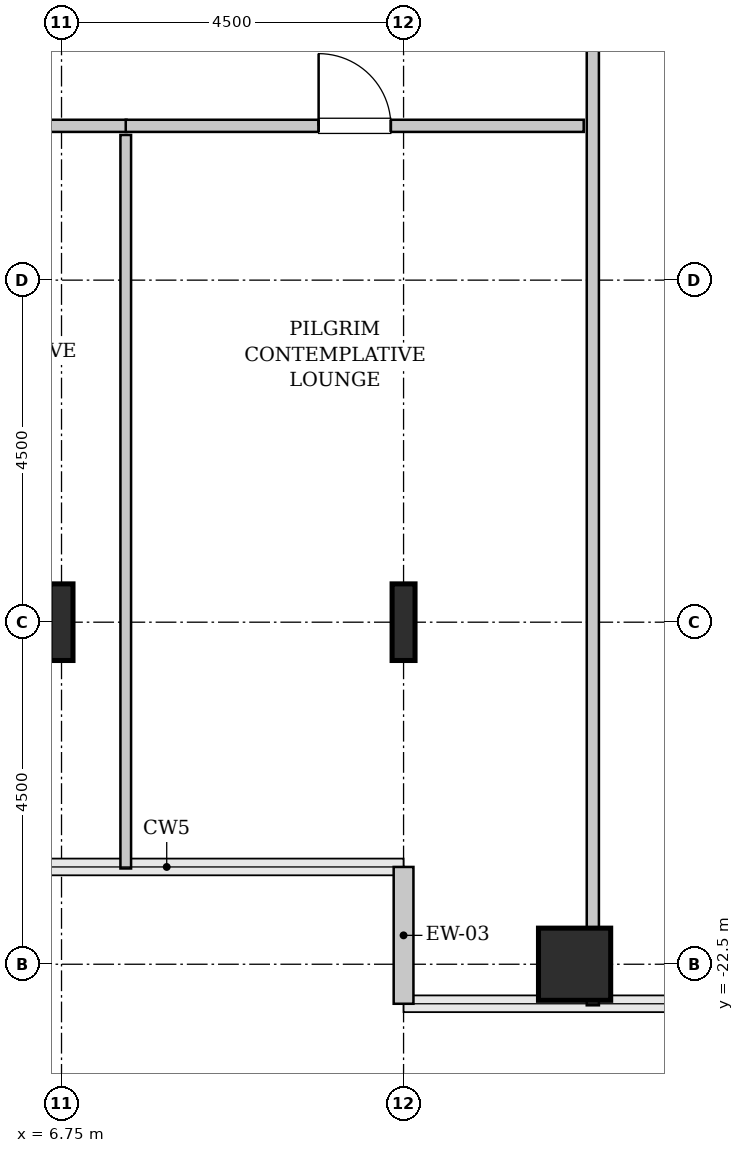
"""IFC4 building model, lengths in metres.
Left out: names, types, materials, properties, quantities, classifications, styles, units other than length and angle.
Written with IfcOpenShell. Run it as: python <this file> out.ifc"""

import sys

from ifc_helpers import new_model, si_unit, direction, frame, frame_2d, origin, origin_2d, place, context, subcontext, project, spatial, rectangle, hollow_rectangle, i_section, extrude, source, transform, mapped, element, fill, save


model = new_model("IFC4")
c1 = context("Model", 3, precision=1e-05, world=origin(), true_north=direction((0.0, 1.0)))
c2 = subcontext(c1, "Body", "Model", "MODEL_VIEW")
j1 = project(units=[si_unit("LENGTHUNIT", "METRE"), si_unit("PLANEANGLEUNIT", "RADIAN")], contexts=[c1])
p1 = place(None, origin())
s1 = spatial("IfcSite", under=j1, at=p1, CompositionType="ELEMENT")
p2 = place(p1, origin())
s2 = spatial("IfcBuilding", under=s1, at=p2, CompositionType="ELEMENT")
p3 = place(p2, frame((0.0, 0.0, 52.0)))
s3 = spatial("IfcBuildingStorey", under=s2, at=p3, CompositionType="ELEMENT", Elevation=52.0)
m1 = source(origin(), c2, "Body", "SweptSolid", [
    extrude(i_section(OverallWidth=0.302, OverallDepth=1.008, WebThickness=0.021, FlangeThickness=0.04, FilletRadius=0.03, at=origin_2d()), origin(), (0.0, 0.0, 1.0), 3.8),
])
for number, where, z_axis, x_axis in (
    (1, (6.75, -18.0, 0.0), (0.0, 0.0, 1.0), (1.0, 0.0, 0.0)),
    (2, (11.25, -18.0, 0.0), (0.0, 0.0, 1.0), (1.0, 0.0, 0.0)),
):
    element("IfcColumn", number, at=place(p3, frame(where, z_axis=z_axis, x_axis=x_axis)), inside=s3, PredefinedType="COLUMN", context=c2, shape_type="MappedRepresentation", body=[
        mapped(m1, transform((0.0, 0.0, 0.0), x_axis=(1.0, 0.0, 0.0), y_axis=(0.0, 1.0, 0.0), z_axis=(0.0, 0.0, 1.0), scale=1.0)),
    ])
m2 = source(origin(), c2, "Body", "SweptSolid", [
    extrude(hollow_rectangle(XDim=0.95, YDim=0.95, WallThickness=0.045, InnerFilletRadius=0.045, OuterFilletRadius=0.09, at=origin_2d()), origin(), (0.0, 0.0, 1.0), 3.8),
])
p4 = place(p3, frame((13.5, -22.5, 0.0), z_axis=(0.0, 0.0, 1.0), x_axis=(1.0, 0.0, 0.0)))
e3 = element("IfcColumn", 3, at=p4, inside=s3, PredefinedType="COLUMN", context=c2, shape_type="MappedRepresentation", body=[
    mapped(m2, transform((0.0, 0.0, 0.0), x_axis=(1.0, 0.0, 0.0), y_axis=(0.0, 1.0, 0.0), z_axis=(0.0, 0.0, 1.0), scale=1.0)),
])
m3 = source(origin(), c2, "Body", "SweptSolid", [
    extrude(rectangle(XDim=1.8, YDim=0.26, at=frame_2d((0.9, 0.0))), origin(), (0.0, 0.0, 1.0), 3.55),
])
p5 = place(p3, frame((11.25, -21.22, 0.0), z_axis=(0.0, 0.0, 1.0), x_axis=(0.0, -1.0, 0.0)))
e4 = element("IfcWall", 4, at=p5, inside=s3, PredefinedType="SOLIDWALL", context=c2, shape_type="MappedRepresentation", body=[
    mapped(m3, transform((0.0, 0.0, 0.0), x_axis=(1.0, 0.0, 0.0), y_axis=(0.0, 1.0, 0.0), z_axis=(0.0, 0.0, 1.0), scale=1.0)),
])
m4 = source(origin(), c2, "Body", "SweptSolid", [
    extrude(rectangle(XDim=15.845, YDim=0.16, at=frame_2d((7.922, 0.0))), origin(), (0.0, 0.0, 1.0), 3.535),
])
p6 = place(p3, frame((13.74, -23.04, 0.0), z_axis=(0.0, 0.0, 1.0), x_axis=(0.0, 1.0, 0.0)))
e5 = element("IfcWall", 5, at=p6, inside=s3, PredefinedType="PARTITIONING", context=c2, shape_type="MappedRepresentation", body=[
    mapped(m4, transform((0.0, 0.0, 0.0), x_axis=(1.0, 0.0, 0.0), y_axis=(0.0, 1.0, 0.0), z_axis=(0.0, 0.0, 1.0), scale=1.0)),
])
p7 = place(p6, frame((13.212, 0.0, 0.0)))
e6 = element("IfcOpeningElement", 6, at=p7, cuts=e5, PredefinedType="OPENING", context=c2, shape_type="SweptSolid", body=[
    extrude(rectangle(XDim=0.95, YDim=2.1, at=frame_2d((0.475, 1.05))), frame((0.0, 0.09, 0.0), z_axis=(0.0, -1.0, 0.0), x_axis=(1.0, 0.0, 0.0)), (0.0, 0.0, 1.0), 0.18),
])
m5 = source(origin(), c2, "Body", "SweptSolid", [
    extrude(rectangle(XDim=3.705, YDim=0.16, at=frame_2d((1.853, 0.0))), origin(), (0.0, 0.0, 1.0), 3.535),
])
p8 = place(p3, frame((3.9, -11.47, 0.0), z_axis=(0.0, 0.0, 1.0), x_axis=(1.0, 0.0, 0.0)))
e7 = element("IfcWall", 7, at=p8, inside=s3, PredefinedType="PARTITIONING", context=c2, shape_type="MappedRepresentation", body=[
    mapped(m5, transform((0.0, 0.0, 0.0), x_axis=(1.0, 0.0, 0.0), y_axis=(0.0, 1.0, 0.0), z_axis=(0.0, 0.0, 1.0), scale=1.0)),
])
p9 = place(p8, frame((1.377, 0.0, 0.0)))
e8 = element("IfcOpeningElement", 8, at=p9, cuts=e7, PredefinedType="OPENING", context=c2, shape_type="SweptSolid", body=[
    extrude(rectangle(XDim=0.95, YDim=2.1, at=frame_2d((0.475, 1.05))), frame((0.0, 0.09, 0.0), z_axis=(0.0, -1.0, 0.0), x_axis=(1.0, 0.0, 0.0)), (0.0, 0.0, 1.0), 0.18),
])
m6 = source(origin(), c2, "Body", "SweptSolid", [
    extrude(rectangle(XDim=9.65, YDim=0.14, at=frame_2d((4.825, 0.0))), origin(), (0.0, 0.0, 1.0), 3.535),
])
p10 = place(p3, frame((7.595, -21.24, 0.0), z_axis=(0.0, 0.0, 1.0), x_axis=(0.0, 1.0, 0.0)))
e9 = element("IfcWall", 9, at=p10, inside=s3, PredefinedType="PARTITIONING", context=c2, shape_type="MappedRepresentation", body=[
    mapped(m6, transform((0.0, 0.0, 0.0), x_axis=(1.0, 0.0, 0.0), y_axis=(0.0, 1.0, 0.0), z_axis=(0.0, 0.0, 1.0), scale=1.0)),
])
m7 = source(origin(), c2, "Body", "SweptSolid", [
    extrude(rectangle(XDim=6.025, YDim=0.16, at=frame_2d((3.013, 0.0))), origin(), (0.0, 0.0, 1.0), 3.535),
])
p11 = place(p3, frame((7.595, -11.47, 0.0), z_axis=(0.0, 0.0, 1.0), x_axis=(1.0, 0.0, 0.0)))
e10 = element("IfcWall", 10, at=p11, inside=s3, PredefinedType="PARTITIONING", context=c2, shape_type="MappedRepresentation", body=[
    mapped(m7, transform((0.0, 0.0, 0.0), x_axis=(1.0, 0.0, 0.0), y_axis=(0.0, 1.0, 0.0), z_axis=(0.0, 0.0, 1.0), scale=1.0)),
])
p12 = place(p11, frame((2.538, 0.0, 0.0)))
e11 = element("IfcOpeningElement", 11, at=p12, cuts=e10, PredefinedType="OPENING", context=c2, shape_type="SweptSolid", body=[
    extrude(rectangle(XDim=0.95, YDim=2.1, at=frame_2d((0.475, 1.05))), frame((0.0, 0.09, 0.0), z_axis=(0.0, -1.0, 0.0), x_axis=(1.0, 0.0, 0.0)), (0.0, 0.0, 1.0), 0.18),
])
m8 = source(origin(), c2, "Body", "SweptSolid", [
    extrude(rectangle(XDim=0.95, YDim=2.1, at=frame_2d((0.475, 1.05))), frame((0.0, 0.025, 0.0), z_axis=(0.0, -1.0, 0.0), x_axis=(1.0, 0.0, 0.0)), (0.0, 0.0, 1.0), 0.05),
])
p13 = place(p12, origin())
e12 = element("IfcDoor", 12, at=p13, inside=s3, OperationType="SINGLE_SWING_LEFT", PredefinedType="DOOR", context=c2, shape_type="MappedRepresentation", body=[
    mapped(m8, transform((0.0, 0.0, 0.0), x_axis=(1.0, 0.0, 0.0), y_axis=(0.0, 1.0, 0.0), z_axis=(0.0, 0.0, 1.0), scale=1.0)),
])
fill(e11, e12)
save(model, sys.argv[1])
